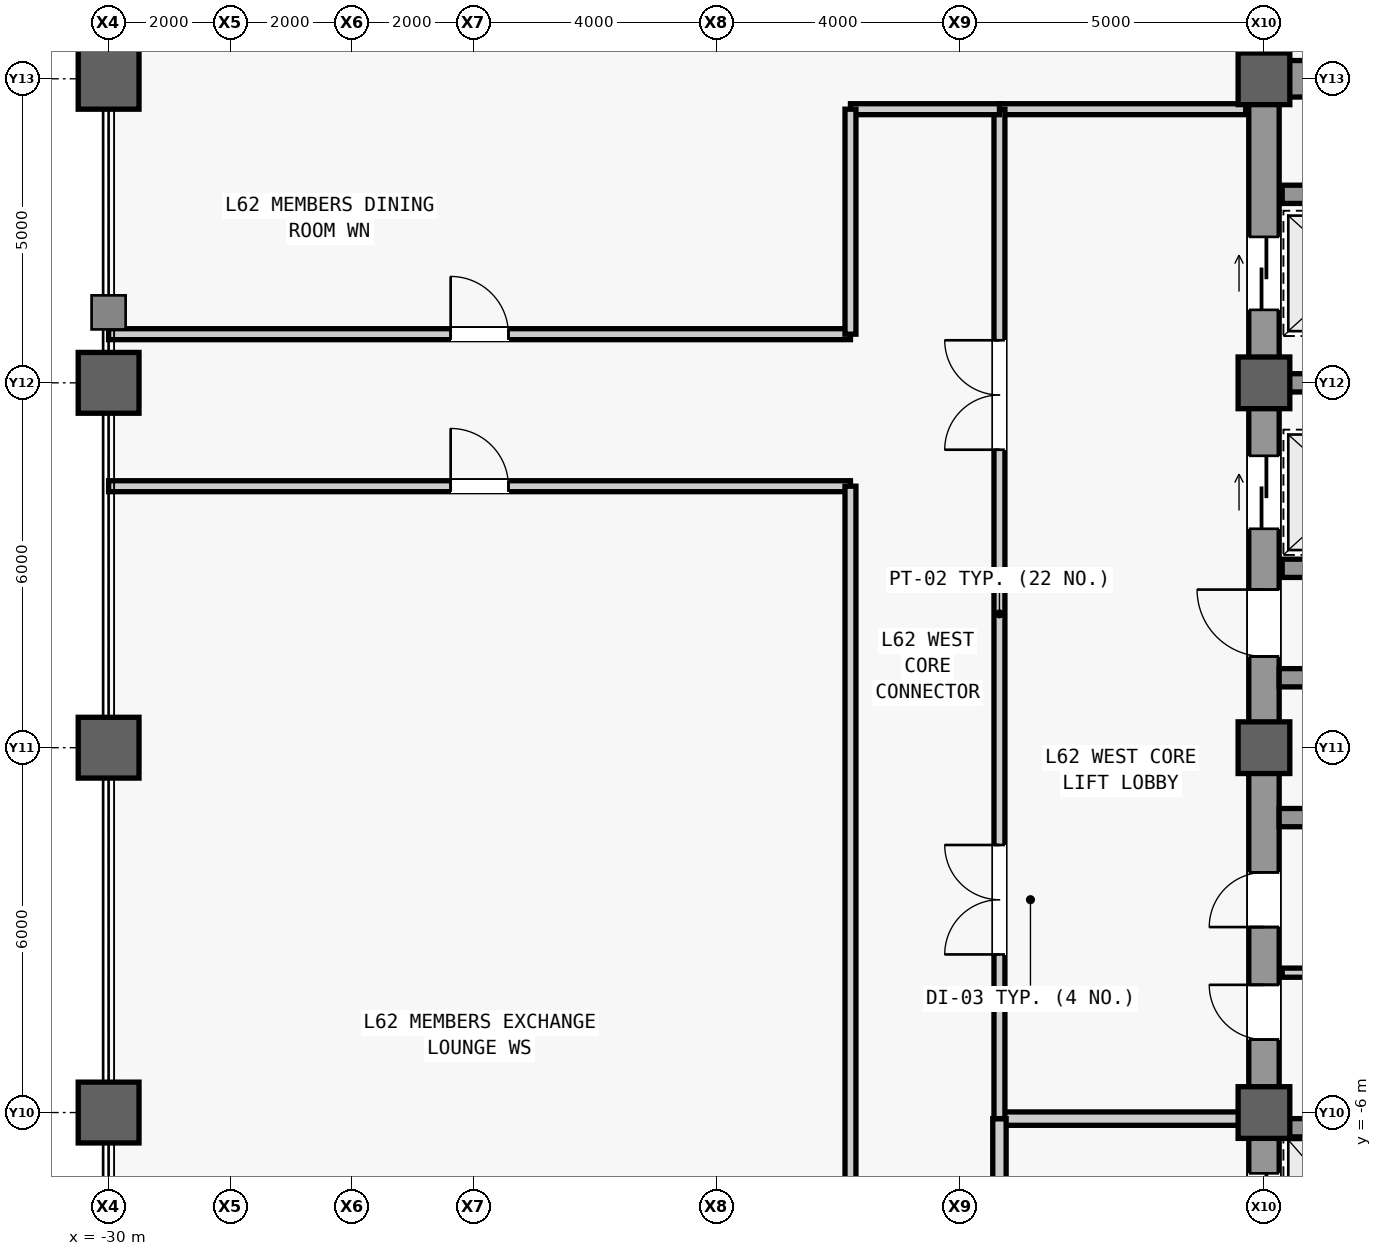
"""IFC4 building model, lengths in metres.
Left out: names, types, materials, properties, quantities, classifications, styles, units other than length and angle.
Written with IfcOpenShell. Run it as: python <this file> out.ifc"""

import sys

from ifc_helpers import new_model, si_unit, direction, frame, frame_2d, origin, origin_2d, place, context, subcontext, project, spatial, rectangle, hollow_rectangle, extrude, source, transform, mapped, element, fill, save


model = new_model("IFC4")
c1 = context("Model", 3, precision=1e-05, world=origin(), true_north=direction((0.0, 1.0)))
c2 = subcontext(c1, "Body", "Model", "MODEL_VIEW")
j1 = project(units=[si_unit("LENGTHUNIT", "METRE"), si_unit("PLANEANGLEUNIT", "RADIAN")], contexts=[c1])
p1 = place(None, origin())
s1 = spatial("IfcSite", under=j1, at=p1, CompositionType="ELEMENT")
p2 = place(p1, origin())
s2 = spatial("IfcBuilding", under=s1, at=p2, CompositionType="ELEMENT")
p3 = place(p2, frame((0.0, 0.0, 263.1)))
s3 = spatial("IfcBuildingStorey", under=s2, at=p3, CompositionType="ELEMENT", Elevation=263.1)
m1 = source(origin(), c2, "Body", "SweptSolid", [
    extrude(rectangle(XDim=22.0, YDim=0.5, at=frame_2d((11.0, 0.0))), origin(), (0.0, 0.0, 1.0), 4.6),
])
p4 = place(p3, frame((-11.0, -11.0, 0.0), z_axis=(0.0, 0.0, 1.0), x_axis=(0.0, 1.0, 0.0)))
e1 = element("IfcWall", 1, at=p4, inside=s3, PredefinedType="SHEAR", context=c2, shape_type="MappedRepresentation", body=[
    mapped(m1, transform((0.0, 0.0, 0.0), scale=1.0)),
])
m2 = source(origin(), c2, "Body", "SweptSolid", [
    extrude(rectangle(XDim=1.1, YDim=2.2, at=frame_2d((0.55, 1.1))), frame((0.0, 0.26, 0.0), z_axis=(0.0, -1.0, 0.0), x_axis=(1.0, 0.0, 0.0)), (0.0, 0.0, 1.0), 0.52),
])
p5 = place(p4, frame((0.8, 0.0, 0.0)))
e2 = element("IfcOpeningElement", 2, at=p5, cuts=e1, PredefinedType="OPENING", context=c2, shape_type="MappedRepresentation", body=[
    mapped(m2, transform((0.0, 0.0, 0.0), scale=1.0)),
])
p6 = place(p4, frame((12.5, 0.0, 0.0)))
e3 = element("IfcOpeningElement", 3, at=p6, cuts=e1, PredefinedType="OPENING", context=c2, shape_type="MappedRepresentation", body=[
    mapped(m2, transform((0.0, 0.0, 0.0), scale=1.0)),
])
m3 = source(origin(), c2, "Body", "SweptSolid", [
    extrude(rectangle(XDim=0.9, YDim=2.15, at=frame_2d((0.45, 1.075))), frame((0.0, 0.26, 0.0), z_axis=(0.0, -1.0, 0.0), x_axis=(1.0, 0.0, 0.0)), (0.0, 0.0, 1.0), 0.52),
])
p7 = place(p4, frame((6.2, 0.0, 0.0)))
e4 = element("IfcOpeningElement", 4, at=p7, cuts=e1, PredefinedType="OPENING", context=c2, shape_type="MappedRepresentation", body=[
    mapped(m3, transform((0.0, 0.0, 0.0), scale=1.0)),
])
p8 = place(p4, frame((8.05, 0.0, 0.0)))
e5 = element("IfcOpeningElement", 5, at=p8, cuts=e1, PredefinedType="OPENING", context=c2, shape_type="MappedRepresentation", body=[
    mapped(m3, transform((0.0, 0.0, 0.0), scale=1.0)),
])
m4 = source(origin(), c2, "Body", "SweptSolid", [
    extrude(rectangle(XDim=1.2, YDim=2.3, at=frame_2d((0.6, 1.15))), frame((0.0, 0.26, 0.0), z_axis=(0.0, -1.0, 0.0), x_axis=(1.0, 0.0, 0.0)), (0.0, 0.0, 1.0), 0.52),
])
p9 = place(p4, frame((14.6, 0.0, 0.0)))
e6 = element("IfcOpeningElement", 6, at=p9, cuts=e1, PredefinedType="OPENING", context=c2, shape_type="MappedRepresentation", body=[
    mapped(m4, transform((0.0, 0.0, 0.0), scale=1.0)),
])
p10 = place(p4, frame((18.2, 0.0, 0.0)))
e7 = element("IfcOpeningElement", 7, at=p10, cuts=e1, PredefinedType="OPENING", context=c2, shape_type="MappedRepresentation", body=[
    mapped(m4, transform((0.0, 0.0, 0.0), scale=1.0)),
])
m5 = source(origin(), c2, "Body", "SweptSolid", [
    extrude(rectangle(XDim=1.3, YDim=2.3, at=frame_2d((0.65, 1.15))), frame((0.0, 0.26, 0.0), z_axis=(0.0, -1.0, 0.0), x_axis=(1.0, 0.0, 0.0)), (0.0, 0.0, 1.0), 0.52),
])
p11 = place(p4, frame((2.7, 0.0, 0.0)))
e8 = element("IfcOpeningElement", 8, at=p11, cuts=e1, PredefinedType="OPENING", context=c2, shape_type="MappedRepresentation", body=[
    mapped(m5, transform((0.0, 0.0, 0.0), scale=1.0)),
])
m6 = source(origin(), c2, "Body", "SweptSolid", [
    extrude(rectangle(XDim=5.9, YDim=0.6, at=frame_2d((2.95, 0.0))), origin(), (0.0, 0.0, 1.0), 4.6),
])
p12 = place(p3, frame((-10.75, 11.0, 0.0), z_axis=(0.0, 0.0, 1.0), x_axis=(1.0, 0.0, 0.0)))
e9 = element("IfcWall", 9, at=p12, inside=s3, PredefinedType="SHEAR", context=c2, shape_type="MappedRepresentation", body=[
    mapped(m6, transform((0.0, 0.0, 0.0), scale=1.0)),
])
m7 = source(origin(), c2, "Body", "SweptSolid", [
    extrude(rectangle(XDim=5.65, YDim=0.3, at=frame_2d((2.825, 0.0))), origin(), (0.0, 0.0, 1.0), 4.6),
])
for number, where, z_axis, x_axis in (
    (10, (-10.75, -1.15, 0.0), (0.0, 0.0, 1.0), (1.0, 0.0, 0.0)),
    (11, (-10.75, 1.15, 0.0), (0.0, 0.0, 1.0), (1.0, 0.0, 0.0)),
):
    element("IfcWall", number, at=place(p3, frame(where, z_axis=z_axis, x_axis=x_axis)), inside=s3, PredefinedType="SHEAR", context=c2, shape_type="MappedRepresentation", body=[
        mapped(m7, transform((0.0, 0.0, 0.0), scale=1.0)),
    ])
m8 = source(origin(), c2, "Body", "SweptSolid", [
    extrude(hollow_rectangle(XDim=1.0, YDim=1.0, WallThickness=0.055, at=origin_2d()), origin(), (0.0, 0.0, 1.0), 5.2),
])
for number, where, z_axis, x_axis in (
    (12, (-30.0, -6.0, 0.0), (0.0, 0.0, 1.0), (1.0, 0.0, 0.0)),
    (13, (-30.0, 0.0, 0.0), (0.0, 0.0, 1.0), (1.0, 0.0, 0.0)),
    (14, (-30.0, 6.0, 0.0), (0.0, 0.0, 1.0), (1.0, 0.0, 0.0)),
    (15, (-30.0, 11.0, 0.0), (0.0, 0.0, 1.0), (1.0, 0.0, 0.0)),
):
    element("IfcColumn", number, at=place(p3, frame(where, z_axis=z_axis, x_axis=x_axis)), inside=s3, PredefinedType="COLUMN", context=c2, shape_type="MappedRepresentation", body=[
        mapped(m8, transform((0.0, 0.0, 0.0), scale=1.0)),
    ])
m9 = source(origin(), c2, "Body", "SweptSolid", [
    extrude(rectangle(XDim=0.85, YDim=0.85, at=origin_2d()), origin(), (0.0, 0.0, 1.0), 5.2),
])
for number, where, z_axis, x_axis in (
    (16, (-11.0, -6.0, 0.0), (0.0, 0.0, 1.0), (1.0, 0.0, 0.0)),
    (17, (-11.0, 0.0, 0.0), (0.0, 0.0, 1.0), (1.0, 0.0, 0.0)),
    (18, (-11.0, 6.0, 0.0), (0.0, 0.0, 1.0), (1.0, 0.0, 0.0)),
    (19, (-11.0, 11.0, 0.0), (0.0, 0.0, 1.0), (1.0, 0.0, 0.0)),
):
    element("IfcColumn", number, at=place(p3, frame(where, z_axis=z_axis, x_axis=x_axis)), inside=s3, PredefinedType="COLUMN", context=c2, shape_type="MappedRepresentation", body=[
        mapped(m9, transform((0.0, 0.0, 0.0), scale=1.0)),
    ])
m10 = source(origin(), c2, "Body", "SweptSolid", [
    extrude(rectangle(XDim=2.2, YDim=0.3, at=frame_2d((1.1, 0.0))), origin(), (0.0, 0.0, 1.0), 4.6),
])
for number, where, z_axis, x_axis in (
    (20, (-10.7, -6.25, 0.0), (0.0, 0.0, 1.0), (1.0, 0.0, 0.0)),
    (21, (-10.7, 2.95, 0.0), (0.0, 0.0, 1.0), (1.0, 0.0, 0.0)),
    (22, (-10.7, 6.0, 0.0), (0.0, 0.0, 1.0), (1.0, 0.0, 0.0)),
    (23, (-10.7, 9.1, 0.0), (0.0, 0.0, 1.0), (1.0, 0.0, 0.0)),
):
    element("IfcWall", number, at=place(p3, frame(where, z_axis=z_axis, x_axis=x_axis)), inside=s3, PredefinedType="SHEAR", context=c2, shape_type="MappedRepresentation", body=[
        mapped(m10, transform((0.0, 0.0, 0.0), scale=1.0)),
    ])
m11 = source(origin(), c2, "Body", "SweptSolid", [
    extrude(rectangle(XDim=2.05, YDim=0.15, at=frame_2d((1.025, 0.0))), origin(), (0.0, 0.0, 1.0), 4.6),
])
p13 = place(p3, frame((-10.7, -3.7, 0.0), z_axis=(0.0, 0.0, 1.0), x_axis=(1.0, 0.0, 0.0)))
e24 = element("IfcWall", 24, at=p13, inside=s3, PredefinedType="PARTITIONING", context=c2, shape_type="MappedRepresentation", body=[
    mapped(m11, transform((0.0, 0.0, 0.0), scale=1.0)),
])
m12 = source(origin(), c2, "Body", "SweptSolid", [
    extrude(rectangle(XDim=4.05, YDim=0.22, at=frame_2d((2.025, 0.0))), origin(), (0.0, 0.0, 1.0), 2.8),
])
p14 = place(p3, frame((-15.35, -6.1, 0.0), z_axis=(0.0, 0.0, 1.0), x_axis=(1.0, 0.0, 0.0)))
e25 = element("IfcWall", 25, at=p14, inside=s3, PredefinedType="PARTITIONING", context=c2, shape_type="MappedRepresentation", body=[
    mapped(m12, transform((0.0, 0.0, 0.0), scale=1.0)),
])
m13 = source(origin(), c2, "Body", "SweptSolid", [
    extrude(rectangle(XDim=4.4, YDim=0.22, at=frame_2d((2.2, 0.0))), origin(), (0.0, 0.0, 1.0), 4.6),
])
p15 = place(p3, frame((-15.35, -10.5, 0.0), z_axis=(0.0, 0.0, 1.0), x_axis=(0.0, 1.0, 0.0)))
e26 = element("IfcWall", 26, at=p15, inside=s3, PredefinedType="PARTITIONING", context=c2, shape_type="MappedRepresentation", body=[
    mapped(m13, transform((0.0, 0.0, 0.0), scale=1.0)),
])
m14 = source(origin(), c2, "Body", "SweptSolid", [
    extrude(rectangle(XDim=1.2, YDim=2.2, at=frame_2d((0.6, 1.1))), frame((0.0, 0.12, 0.0), z_axis=(0.0, -1.0, 0.0), x_axis=(1.0, 0.0, 0.0)), (0.0, 0.0, 1.0), 0.24),
])
p16 = place(p15, frame((1.6, 0.0, 0.0)))
e27 = element("IfcOpeningElement", 27, at=p16, cuts=e26, PredefinedType="OPENING", context=c2, shape_type="MappedRepresentation", body=[
    mapped(m14, transform((0.0, 0.0, 0.0), scale=1.0)),
])
m15 = source(origin(), c2, "Body", "SweptSolid", [
    extrude(rectangle(XDim=4.05, YDim=0.18, at=frame_2d((2.025, 0.0))), origin(), (0.0, 0.0, 1.0), 4.6),
])
p17 = place(p3, frame((-15.35, 10.5, 0.0), z_axis=(0.0, 0.0, 1.0), x_axis=(1.0, 0.0, 0.0)))
e28 = element("IfcWall", 28, at=p17, inside=s3, PredefinedType="PARTITIONING", context=c2, shape_type="MappedRepresentation", body=[
    mapped(m15, transform((0.0, 0.0, 0.0), scale=1.0)),
])
m16 = source(origin(), c2, "Body", "SweptSolid", [
    extrude(rectangle(XDim=16.6, YDim=0.18, at=frame_2d((8.3, 0.0))), origin(), (0.0, 0.0, 1.0), 4.6),
])
p18 = place(p3, frame((-15.35, -6.1, 0.0), z_axis=(0.0, 0.0, 1.0), x_axis=(0.0, 1.0, 0.0)))
e29 = element("IfcWall", 29, at=p18, inside=s3, PredefinedType="PARTITIONING", context=c2, shape_type="MappedRepresentation", body=[
    mapped(m16, transform((0.0, 0.0, 0.0), scale=1.0)),
])
m17 = source(origin(), c2, "Body", "SweptSolid", [
    extrude(rectangle(XDim=1.8, YDim=2.25, at=frame_2d((0.9, 1.125))), frame((0.0, 0.1, 0.0), z_axis=(0.0, -1.0, 0.0), x_axis=(1.0, 0.0, 0.0)), (0.0, 0.0, 1.0), 0.2),
])
p19 = place(p18, frame((2.7, 0.0, 0.0)))
e30 = element("IfcOpeningElement", 30, at=p19, cuts=e29, PredefinedType="OPENING", context=c2, shape_type="MappedRepresentation", body=[
    mapped(m17, transform((0.0, 0.0, 0.0), scale=1.0)),
])
p20 = place(p18, frame((11.0, 0.0, 0.0)))
e31 = element("IfcOpeningElement", 31, at=p20, cuts=e29, PredefinedType="OPENING", context=c2, shape_type="MappedRepresentation", body=[
    mapped(m17, transform((0.0, 0.0, 0.0), scale=1.0)),
])
m18 = source(origin(), c2, "Body", "SweptSolid", [
    extrude(rectangle(XDim=2.45, YDim=0.18, at=frame_2d((1.225, 0.0))), origin(), (0.0, 0.0, 1.0), 4.6),
])
p21 = place(p3, frame((-17.8, 10.5, 0.0), z_axis=(0.0, 0.0, 1.0), x_axis=(1.0, 0.0, 0.0)))
e32 = element("IfcWall", 32, at=p21, inside=s3, PredefinedType="PARTITIONING", context=c2, shape_type="MappedRepresentation", body=[
    mapped(m18, transform((0.0, 0.0, 0.0), scale=1.0)),
])
m19 = source(origin(), c2, "Body", "SweptSolid", [
    extrude(rectangle(XDim=12.2, YDim=0.18, at=frame_2d((6.1, 0.0))), origin(), (0.0, 0.0, 1.0), 4.6),
])
p22 = place(p3, frame((-30.0, 4.3, 0.0), z_axis=(0.0, 0.0, 1.0), x_axis=(1.0, 0.0, 0.0)))
e33 = element("IfcWall", 33, at=p22, inside=s3, PredefinedType="PARTITIONING", context=c2, shape_type="MappedRepresentation", body=[
    mapped(m19, transform((0.0, 0.0, 0.0), scale=1.0)),
])
m20 = source(origin(), c2, "Body", "SweptSolid", [
    extrude(rectangle(XDim=0.95, YDim=2.15, at=frame_2d((0.475, 1.075))), frame((0.0, 0.1, 0.0), z_axis=(0.0, -1.0, 0.0), x_axis=(1.0, 0.0, 0.0)), (0.0, 0.0, 1.0), 0.2),
])
p23 = place(p22, frame((5.625, 0.0, 0.0)))
e34 = element("IfcOpeningElement", 34, at=p23, cuts=e33, PredefinedType="OPENING", context=c2, shape_type="MappedRepresentation", body=[
    mapped(m20, transform((0.0, 0.0, 0.0), scale=1.0)),
])
m21 = source(origin(), c2, "Body", "SweptSolid", [
    extrude(rectangle(XDim=17.9, YDim=0.18, at=frame_2d((8.95, 0.0))), origin(), (0.0, 0.0, 1.0), 4.6),
])
p24 = place(p3, frame((-17.8, -13.6, 0.0), z_axis=(0.0, 0.0, 1.0), x_axis=(0.0, 1.0, 0.0)))
e35 = element("IfcWall", 35, at=p24, inside=s3, PredefinedType="PARTITIONING", context=c2, shape_type="MappedRepresentation", body=[
    mapped(m21, transform((0.0, 0.0, 0.0), scale=1.0)),
])
p25 = place(p3, frame((-30.0, 6.8, 0.0), z_axis=(0.0, 0.0, 1.0), x_axis=(1.0, 0.0, 0.0)))
e36 = element("IfcWall", 36, at=p25, inside=s3, PredefinedType="PARTITIONING", context=c2, shape_type="MappedRepresentation", body=[
    mapped(m19, transform((0.0, 0.0, 0.0), scale=1.0)),
])
p26 = place(p25, frame((5.625, 0.0, 0.0)))
e37 = element("IfcOpeningElement", 37, at=p26, cuts=e36, PredefinedType="OPENING", context=c2, shape_type="MappedRepresentation", body=[
    mapped(m20, transform((0.0, 0.0, 0.0), scale=1.0)),
])
m22 = source(origin(), c2, "Body", "SweptSolid", [
    extrude(rectangle(XDim=3.7, YDim=0.18, at=frame_2d((1.85, 0.0))), origin(), (0.0, 0.0, 1.0), 4.6),
])
p27 = place(p3, frame((-17.8, 6.8, 0.0), z_axis=(0.0, 0.0, 1.0), x_axis=(0.0, 1.0, 0.0)))
e38 = element("IfcWall", 38, at=p27, inside=s3, PredefinedType="PARTITIONING", context=c2, shape_type="MappedRepresentation", body=[
    mapped(m22, transform((0.0, 0.0, 0.0), scale=1.0)),
])
m23 = source(origin(), c2, "Body", "SweptSolid", [
    extrude(rectangle(XDim=1.1, YDim=2.2, at=frame_2d((0.55, 1.1))), frame((0.0, 0.025, 0.0), z_axis=(0.0, -1.0, 0.0), x_axis=(1.0, 0.0, 0.0)), (0.0, 0.0, 1.0), 0.05),
])
p28 = place(p6, origin())
e39 = element("IfcDoor", 39, at=p28, inside=s3, OperationType="SINGLE_SWING_RIGHT", PredefinedType="DOOR", context=c2, shape_type="MappedRepresentation", body=[
    mapped(m23, transform((0.0, 0.0, 0.0), scale=1.0)),
])
fill(e3, e39)
m24 = source(origin(), c2, "Body", "SweptSolid", [
    extrude(rectangle(XDim=0.9, YDim=2.15, at=frame_2d((0.45, 1.075))), frame((0.0, 0.025, 0.0), z_axis=(0.0, -1.0, 0.0), x_axis=(1.0, 0.0, 0.0)), (0.0, 0.0, 1.0), 0.05),
])
p29 = place(p7, origin())
e40 = element("IfcDoor", 40, at=p29, inside=s3, OperationType="SINGLE_SWING_RIGHT", PredefinedType="DOOR", context=c2, shape_type="MappedRepresentation", body=[
    mapped(m24, transform((0.0, 0.0, 0.0), scale=1.0)),
])
fill(e4, e40)
p30 = place(p8, origin())
e41 = element("IfcDoor", 41, at=p30, inside=s3, OperationType="SINGLE_SWING_LEFT", PredefinedType="DOOR", context=c2, shape_type="MappedRepresentation", body=[
    mapped(m24, transform((0.0, 0.0, 0.0), scale=1.0)),
])
fill(e5, e41)
m25 = source(origin(), c2, "Body", "SweptSolid", [
    extrude(rectangle(XDim=1.8, YDim=2.25, at=frame_2d((0.9, 1.125))), frame((0.0, 0.025, 0.0), z_axis=(0.0, -1.0, 0.0), x_axis=(1.0, 0.0, 0.0)), (0.0, 0.0, 1.0), 0.05),
])
p31 = place(p19, origin())
e42 = element("IfcDoor", 42, at=p31, inside=s3, OperationType="SINGLE_SWING_LEFT", PredefinedType="DOOR", context=c2, shape_type="MappedRepresentation", body=[
    mapped(m25, transform((0.0, 0.0, 0.0), scale=1.0)),
])
fill(e30, e42)
p32 = place(p20, origin())
e43 = element("IfcDoor", 43, at=p32, inside=s3, OperationType="SINGLE_SWING_RIGHT", PredefinedType="DOOR", context=c2, shape_type="MappedRepresentation", body=[
    mapped(m25, transform((0.0, 0.0, 0.0), scale=1.0)),
])
fill(e31, e43)
m26 = source(origin(), c2, "Body", "SweptSolid", [
    extrude(rectangle(XDim=0.95, YDim=2.15, at=frame_2d((0.475, 1.075))), frame((0.0, 0.025, 0.0), z_axis=(0.0, -1.0, 0.0), x_axis=(1.0, 0.0, 0.0)), (0.0, 0.0, 1.0), 0.05),
])
p33 = place(p23, origin())
e44 = element("IfcDoor", 44, at=p33, inside=s3, OperationType="SINGLE_SWING_LEFT", PredefinedType="DOOR", context=c2, shape_type="MappedRepresentation", body=[
    mapped(m26, transform((0.0, 0.0, 0.0), scale=1.0)),
])
fill(e34, e44)
p34 = place(p26, origin())
e45 = element("IfcDoor", 45, at=p34, inside=s3, OperationType="SINGLE_SWING_LEFT", PredefinedType="DOOR", context=c2, shape_type="MappedRepresentation", body=[
    mapped(m26, transform((0.0, 0.0, 0.0), scale=1.0)),
])
fill(e37, e45)
m27 = source(origin(), c2, "Body", "SweptSolid", [
    extrude(rectangle(XDim=1.2, YDim=2.3, at=frame_2d((0.6, 1.15))), frame((0.0, 0.025, 0.0), z_axis=(0.0, -1.0, 0.0), x_axis=(1.0, 0.0, 0.0)), (0.0, 0.0, 1.0), 0.05),
])
p35 = place(p9, origin())
e46 = element("IfcDoor", 46, at=p35, inside=s3, OperationType="SLIDING_TO_LEFT", PredefinedType="DOOR", context=c2, shape_type="MappedRepresentation", body=[
    mapped(m27, transform((0.0, 0.0, 0.0), scale=1.0)),
])
fill(e6, e46)
p36 = place(p10, origin())
e47 = element("IfcDoor", 47, at=p36, inside=s3, OperationType="SLIDING_TO_LEFT", PredefinedType="DOOR", context=c2, shape_type="MappedRepresentation", body=[
    mapped(m27, transform((0.0, 0.0, 0.0), scale=1.0)),
])
fill(e7, e47)
m28 = source(origin(), c2, "Body", "SweptSolid", [
    extrude(rectangle(XDim=1.3, YDim=2.3, at=frame_2d((0.65, 1.15))), frame((0.0, 0.025, 0.0), z_axis=(0.0, -1.0, 0.0), x_axis=(1.0, 0.0, 0.0)), (0.0, 0.0, 1.0), 0.05),
])
p37 = place(p11, origin())
e48 = element("IfcDoor", 48, at=p37, inside=s3, OperationType="SLIDING_TO_LEFT", PredefinedType="DOOR", context=c2, shape_type="MappedRepresentation", body=[
    mapped(m28, transform((0.0, 0.0, 0.0), scale=1.0)),
])
fill(e8, e48)
save(model, sys.argv[1])
